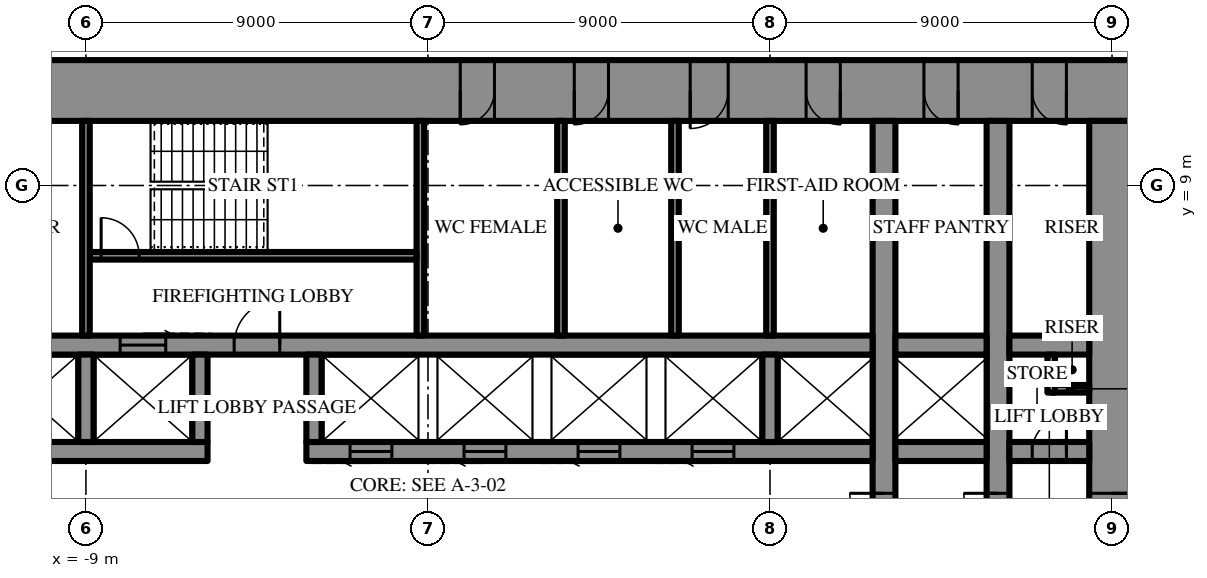
"""IFC4 building model, lengths in metres.
Left out: names, types, materials, properties, quantities, classifications, styles, units other than length and angle.
Written with IfcOpenShell. Run it as: python <this file> out.ifc"""

import sys

from ifc_helpers import new_model, si_unit, direction, frame, frame_2d, origin, place, context, subcontext, project, spatial, rectangle, extrude, element, fill, save


model = new_model("IFC4")
c1 = context("Model", 3, precision=1e-05, world=origin(), true_north=direction((0.0, 1.0)))
c2 = subcontext(c1, "Body", "Model", "MODEL_VIEW")
j1 = project(units=[si_unit("LENGTHUNIT", "METRE"), si_unit("PLANEANGLEUNIT", "RADIAN")], contexts=[c1])
p1 = place(None, origin())
s1 = spatial("IfcSite", under=j1, at=p1, CompositionType="ELEMENT")
p2 = place(p1, origin())
s2 = spatial("IfcBuilding", under=s1, at=p2, CompositionType="ELEMENT")
p3 = place(p2, frame((0.0, 0.0, 182.5)))
s3 = spatial("IfcBuildingStorey", under=s2, at=p3, CompositionType="ELEMENT", Elevation=182.5)
p4 = place(p3, frame((-18.6, 11.5, 0.0), z_axis=(0.0, 0.0, 1.0), x_axis=(1.0, 0.0, 0.0)))
e1 = element("IfcWall", 1, at=p4, inside=s3, PredefinedType="SHEAR", context=c2, shape_type="SweptSolid", body=[
    extrude(rectangle(XDim=37.2, YDim=1.6, at=frame_2d((18.6, 0.0))), origin(), (0.0, 0.0, 1.0), 4.2),
])
p5 = place(p4, frame((19.45, 0.0, 0.0)))
e2 = element("IfcOpeningElement", 2, at=p5, cuts=e1, PredefinedType="OPENING", context=c2, shape_type="SweptSolid", body=[
    extrude(rectangle(XDim=0.9, YDim=2.2, at=frame_2d((0.45, 1.1))), frame((0.0, 0.81, 0.0), z_axis=(0.0, -1.0, 0.0), x_axis=(1.0, 0.0, 0.0)), (0.0, 0.0, 1.0), 1.62),
])
p6 = place(p4, frame((22.45, 0.0, 0.0)))
e3 = element("IfcOpeningElement", 3, at=p6, cuts=e1, PredefinedType="OPENING", context=c2, shape_type="SweptSolid", body=[
    extrude(rectangle(XDim=0.9, YDim=2.2, at=frame_2d((0.45, 1.1))), frame((0.0, 0.81, 0.0), z_axis=(0.0, -1.0, 0.0), x_axis=(1.0, 0.0, 0.0)), (0.0, 0.0, 1.0), 1.62),
])
p7 = place(p4, frame((25.5, 0.0, 0.0)))
e4 = element("IfcOpeningElement", 4, at=p7, cuts=e1, PredefinedType="OPENING", context=c2, shape_type="SweptSolid", body=[
    extrude(rectangle(XDim=1.0, YDim=2.2, at=frame_2d((0.5, 1.1))), frame((0.0, 0.81, 0.0), z_axis=(0.0, -1.0, 0.0), x_axis=(1.0, 0.0, 0.0)), (0.0, 0.0, 1.0), 1.62),
])
p8 = place(p4, frame((1.8, 0.0, 0.0)))
e5 = element("IfcOpeningElement", 5, at=p8, cuts=e1, PredefinedType="OPENING", context=c2, shape_type="SweptSolid", body=[
    extrude(rectangle(XDim=0.9, YDim=2.2, at=frame_2d((0.45, 1.1))), frame((0.0, 0.81, 0.0), z_axis=(0.0, -1.0, 0.0), x_axis=(1.0, 0.0, 0.0)), (0.0, 0.0, 1.0), 1.62),
])
p9 = place(p4, frame((4.65, 0.0, 0.0)))
e6 = element("IfcOpeningElement", 6, at=p9, cuts=e1, PredefinedType="OPENING", context=c2, shape_type="SweptSolid", body=[
    extrude(rectangle(XDim=0.9, YDim=2.2, at=frame_2d((0.45, 1.1))), frame((0.0, 0.81, 0.0), z_axis=(0.0, -1.0, 0.0), x_axis=(1.0, 0.0, 0.0)), (0.0, 0.0, 1.0), 1.62),
])
p10 = place(p4, frame((7.75, 0.0, 0.0)))
e7 = element("IfcOpeningElement", 7, at=p10, cuts=e1, PredefinedType="OPENING", context=c2, shape_type="SweptSolid", body=[
    extrude(rectangle(XDim=0.9, YDim=2.2, at=frame_2d((0.45, 1.1))), frame((0.0, 0.81, 0.0), z_axis=(0.0, -1.0, 0.0), x_axis=(1.0, 0.0, 0.0)), (0.0, 0.0, 1.0), 1.62),
])
p11 = place(p4, frame((28.55, 0.0, 0.0)))
e8 = element("IfcOpeningElement", 8, at=p11, cuts=e1, PredefinedType="OPENING", context=c2, shape_type="SweptSolid", body=[
    extrude(rectangle(XDim=0.9, YDim=2.2, at=frame_2d((0.45, 1.1))), frame((0.0, 0.81, 0.0), z_axis=(0.0, -1.0, 0.0), x_axis=(1.0, 0.0, 0.0)), (0.0, 0.0, 1.0), 1.62),
])
p12 = place(p4, frame((31.65, 0.0, 0.0)))
e9 = element("IfcOpeningElement", 9, at=p12, cuts=e1, PredefinedType="OPENING", context=c2, shape_type="SweptSolid", body=[
    extrude(rectangle(XDim=0.9, YDim=2.2, at=frame_2d((0.45, 1.1))), frame((0.0, 0.81, 0.0), z_axis=(0.0, -1.0, 0.0), x_axis=(1.0, 0.0, 0.0)), (0.0, 0.0, 1.0), 1.62),
])
p13 = place(p4, frame((34.5, 0.0, 0.0)))
e10 = element("IfcOpeningElement", 10, at=p13, cuts=e1, PredefinedType="OPENING", context=c2, shape_type="SweptSolid", body=[
    extrude(rectangle(XDim=0.9, YDim=2.2, at=frame_2d((0.45, 1.1))), frame((0.0, 0.81, 0.0), z_axis=(0.0, -1.0, 0.0), x_axis=(1.0, 0.0, 0.0)), (0.0, 0.0, 1.0), 1.62),
])
p14 = place(p3, frame((18.0, -10.7, 0.0), z_axis=(0.0, 0.0, 1.0), x_axis=(0.0, 1.0, 0.0)))
e11 = element("IfcWall", 11, at=p14, inside=s3, PredefinedType="SHEAR", context=c2, shape_type="SweptSolid", body=[
    extrude(rectangle(XDim=21.4, YDim=1.2, at=frame_2d((10.7, 0.0))), origin(), (0.0, 0.0, 1.0), 4.2),
])
p15 = place(p14, frame((9.8, 0.0, 0.0)))
e12 = element("IfcOpeningElement", 12, at=p15, cuts=e11, PredefinedType="OPENING", context=c2, shape_type="SweptSolid", body=[
    extrude(rectangle(XDim=1.8, YDim=2.4, at=frame_2d((0.9, 1.2))), frame((0.0, 0.61, 0.0), z_axis=(0.0, -1.0, 0.0), x_axis=(1.0, 0.0, 0.0)), (0.0, 0.0, 1.0), 1.22),
])
p16 = place(p3, frame((12.0, -10.7, 0.0), z_axis=(0.0, 0.0, 1.0), x_axis=(0.0, 1.0, 0.0)))
e13 = element("IfcWall", 13, at=p16, inside=s3, PredefinedType="SHEAR", context=c2, shape_type="SweptSolid", body=[
    extrude(rectangle(XDim=21.4, YDim=0.6, at=frame_2d((10.7, 0.0))), origin(), (0.0, 0.0, 1.0), 4.2),
])
p17 = place(p16, frame((9.8, 0.0, 0.0)))
e14 = element("IfcOpeningElement", 14, at=p17, cuts=e13, PredefinedType="OPENING", context=c2, shape_type="SweptSolid", body=[
    extrude(rectangle(XDim=1.8, YDim=2.4, at=frame_2d((0.9, 1.2))), frame((0.0, 0.31, 0.0), z_axis=(0.0, -1.0, 0.0), x_axis=(1.0, 0.0, 0.0)), (0.0, 0.0, 1.0), 0.62),
])
p18 = place(p3, frame((15.0, -10.7, 0.0), z_axis=(0.0, 0.0, 1.0), x_axis=(0.0, 1.0, 0.0)))
e15 = element("IfcWall", 15, at=p18, inside=s3, PredefinedType="SHEAR", context=c2, shape_type="SweptSolid", body=[
    extrude(rectangle(XDim=21.4, YDim=0.6, at=frame_2d((10.7, 0.0))), origin(), (0.0, 0.0, 1.0), 4.2),
])
p19 = place(p18, frame((9.8, 0.0, 0.0)))
e16 = element("IfcOpeningElement", 16, at=p19, cuts=e15, PredefinedType="OPENING", context=c2, shape_type="SweptSolid", body=[
    extrude(rectangle(XDim=1.8, YDim=2.4, at=frame_2d((0.9, 1.2))), frame((0.0, 0.31, 0.0), z_axis=(0.0, -1.0, 0.0), x_axis=(1.0, 0.0, 0.0)), (0.0, 0.0, 1.0), 0.62),
])
p20 = place(p3, frame((-11.7, 2.0, 0.0), z_axis=(0.0, 0.0, 1.0), x_axis=(1.0, 0.0, 0.0)))
e17 = element("IfcWall", 17, at=p20, inside=s3, PredefinedType="SHEAR", context=c2, shape_type="SweptSolid", body=[
    extrude(rectangle(XDim=5.9, YDim=0.5, at=frame_2d((2.95, 0.0))), origin(), (0.0, 0.0, 1.0), 4.2),
])
p21 = place(p3, frame((-3.2, 2.0, 0.0), z_axis=(0.0, 0.0, 1.0), x_axis=(1.0, 0.0, 0.0)))
e18 = element("IfcWall", 18, at=p21, inside=s3, PredefinedType="SHEAR", context=c2, shape_type="SweptSolid", body=[
    extrude(rectangle(XDim=14.9, YDim=0.5, at=frame_2d((7.45, 0.0))), origin(), (0.0, 0.0, 1.0), 4.2),
])
p22 = place(p21, frame((1.15, 0.0, 0.0)))
e19 = element("IfcOpeningElement", 19, at=p22, cuts=e18, PredefinedType="OPENING", context=c2, shape_type="SweptSolid", body=[
    extrude(rectangle(XDim=1.1, YDim=2.2, at=frame_2d((0.55, 1.1))), frame((0.0, 0.26, 0.0), z_axis=(0.0, -1.0, 0.0), x_axis=(1.0, 0.0, 0.0)), (0.0, 0.0, 1.0), 0.52),
])
p23 = place(p21, frame((4.15, 0.0, 0.0)))
e20 = element("IfcOpeningElement", 20, at=p23, cuts=e18, PredefinedType="OPENING", context=c2, shape_type="SweptSolid", body=[
    extrude(rectangle(XDim=1.1, YDim=2.2, at=frame_2d((0.55, 1.1))), frame((0.0, 0.26, 0.0), z_axis=(0.0, -1.0, 0.0), x_axis=(1.0, 0.0, 0.0)), (0.0, 0.0, 1.0), 0.52),
])
p24 = place(p21, frame((7.15, 0.0, 0.0)))
e21 = element("IfcOpeningElement", 21, at=p24, cuts=e18, PredefinedType="OPENING", context=c2, shape_type="SweptSolid", body=[
    extrude(rectangle(XDim=1.1, YDim=2.2, at=frame_2d((0.55, 1.1))), frame((0.0, 0.26, 0.0), z_axis=(0.0, -1.0, 0.0), x_axis=(1.0, 0.0, 0.0)), (0.0, 0.0, 1.0), 0.52),
])
p25 = place(p21, frame((10.15, 0.0, 0.0)))
e22 = element("IfcOpeningElement", 22, at=p25, cuts=e18, PredefinedType="OPENING", context=c2, shape_type="SweptSolid", body=[
    extrude(rectangle(XDim=1.1, YDim=2.2, at=frame_2d((0.55, 1.1))), frame((0.0, 0.26, 0.0), z_axis=(0.0, -1.0, 0.0), x_axis=(1.0, 0.0, 0.0)), (0.0, 0.0, 1.0), 0.52),
])
p26 = place(p3, frame((12.3, 2.0, 0.0), z_axis=(0.0, 0.0, 1.0), x_axis=(1.0, 0.0, 0.0)))
e23 = element("IfcWall", 23, at=p26, inside=s3, PredefinedType="SHEAR", context=c2, shape_type="SweptSolid", body=[
    extrude(rectangle(XDim=2.4, YDim=0.5, at=frame_2d((1.2, 0.0))), origin(), (0.0, 0.0, 1.0), 4.2),
])
p27 = place(p3, frame((15.3, 2.0, 0.0), z_axis=(0.0, 0.0, 1.0), x_axis=(1.0, 0.0, 0.0)))
e24 = element("IfcWall", 24, at=p27, inside=s3, PredefinedType="SHEAR", context=c2, shape_type="SweptSolid", body=[
    extrude(rectangle(XDim=2.1, YDim=0.5, at=frame_2d((1.05, 0.0))), origin(), (0.0, 0.0, 1.0), 4.2),
])
p28 = place(p27, frame((0.6, 0.0, 0.0)))
e25 = element("IfcOpeningElement", 25, at=p28, cuts=e24, PredefinedType="OPENING", context=c2, shape_type="SweptSolid", body=[
    extrude(rectangle(XDim=0.9, YDim=2.2, at=frame_2d((0.45, 1.1))), frame((0.0, 0.26, 0.0), z_axis=(0.0, -1.0, 0.0), x_axis=(1.0, 0.0, 0.0)), (0.0, 0.0, 1.0), 0.52),
])
p29 = place(p3, frame((-11.7, 4.8, 0.0), z_axis=(0.0, 0.0, 1.0), x_axis=(1.0, 0.0, 0.0)))
e26 = element("IfcWall", 26, at=p29, inside=s3, PredefinedType="SHEAR", context=c2, shape_type="SweptSolid", body=[
    extrude(rectangle(XDim=23.4, YDim=0.5, at=frame_2d((11.7, 0.0))), origin(), (0.0, 0.0, 1.0), 4.2),
])
p30 = place(p29, frame((6.6, 0.0, 0.0)))
e27 = element("IfcOpeningElement", 27, at=p30, cuts=e26, PredefinedType="OPENING", context=c2, shape_type="SweptSolid", body=[
    extrude(rectangle(XDim=1.2, YDim=2.2, at=frame_2d((0.6, 1.1))), frame((0.0, 0.26, 0.0), z_axis=(0.0, -1.0, 0.0), x_axis=(1.0, 0.0, 0.0)), (0.0, 0.0, 1.0), 0.52),
])
p31 = place(p29, frame((3.6, 0.0, 0.0)))
e28 = element("IfcOpeningElement", 28, at=p31, cuts=e26, PredefinedType="OPENING", context=c2, shape_type="SweptSolid", body=[
    extrude(rectangle(XDim=1.2, YDim=2.2, at=frame_2d((0.6, 1.1))), frame((0.0, 0.26, 0.0), z_axis=(0.0, -1.0, 0.0), x_axis=(1.0, 0.0, 0.0)), (0.0, 0.0, 1.0), 0.52),
])
p32 = place(p3, frame((12.3, 4.8, 0.0), z_axis=(0.0, 0.0, 1.0), x_axis=(1.0, 0.0, 0.0)))
e29 = element("IfcWall", 29, at=p32, inside=s3, PredefinedType="SHEAR", context=c2, shape_type="SweptSolid", body=[
    extrude(rectangle(XDim=2.4, YDim=0.5, at=frame_2d((1.2, 0.0))), origin(), (0.0, 0.0, 1.0), 4.2),
])
p33 = place(p3, frame((15.3, 4.8, 0.0), z_axis=(0.0, 0.0, 1.0), x_axis=(1.0, 0.0, 0.0)))
e30 = element("IfcWall", 30, at=p33, inside=s3, PredefinedType="SHEAR", context=c2, shape_type="SweptSolid", body=[
    extrude(rectangle(XDim=2.1, YDim=0.5, at=frame_2d((1.05, 0.0))), origin(), (0.0, 0.0, 1.0), 4.2),
])
for number, where, z_axis, x_axis in (
    (31, (-9.0, 2.25, 0.0), (0.0, 0.0, 1.0), (0.0, 1.0, 0.0)),
    (32, (-6.0, 2.25, 0.0), (0.0, 0.0, 1.0), (0.0, 1.0, 0.0)),
    (33, (-3.0, 2.25, 0.0), (0.0, 0.0, 1.0), (0.0, 1.0, 0.0)),
    (34, (9.0, 2.25, 0.0), (0.0, 0.0, 1.0), (0.0, 1.0, 0.0)),
):
    element("IfcWall", number, at=place(p3, frame(where, z_axis=z_axis, x_axis=x_axis)), inside=s3, PredefinedType="SHEAR", context=c2, shape_type="SweptSolid", body=[
        extrude(rectangle(XDim=2.3, YDim=0.4, at=frame_2d((1.15, 0.0))), origin(), (0.0, 0.0, 1.0), 4.2),
    ])
p34 = place(p3, frame((-0.2, 5.05, 0.0), z_axis=(0.0, 0.0, 1.0), x_axis=(0.0, 1.0, 0.0)))
e35 = element("IfcWall", 35, at=p34, inside=s3, PredefinedType="SHEAR", context=c2, shape_type="SweptSolid", body=[
    extrude(rectangle(XDim=5.65, YDim=0.2, at=frame_2d((2.825, 0.0))), origin(), (0.0, 0.0, 1.0), 4.2),
])
p35 = place(p3, frame((-8.9, 7.15, 0.0), z_axis=(0.0, 0.0, 1.0), x_axis=(1.0, 0.0, 0.0)))
e36 = element("IfcWall", 36, at=p35, inside=s3, PredefinedType="SHEAR", context=c2, shape_type="SweptSolid", body=[
    extrude(rectangle(XDim=8.6, YDim=0.2, at=frame_2d((4.3, 0.0))), origin(), (0.0, 0.0, 1.0), 4.2),
])
p36 = place(p35, frame((0.3, 0.0, 0.0)))
e37 = element("IfcOpeningElement", 37, at=p36, cuts=e36, PredefinedType="OPENING", context=c2, shape_type="SweptSolid", body=[
    extrude(rectangle(XDim=1.0, YDim=2.2, at=frame_2d((0.5, 1.1))), frame((0.0, 0.11, 0.0), z_axis=(0.0, -1.0, 0.0), x_axis=(1.0, 0.0, 0.0)), (0.0, 0.0, 1.0), 0.22),
])
for number, where, z_axis, x_axis in (
    (38, (-9.0, 5.05, 0.0), (0.0, 0.0, 1.0), (0.0, 1.0, 0.0)),
    (39, (9.0, 5.05, 0.0), (0.0, 0.0, 1.0), (0.0, 1.0, 0.0)),
    (40, (3.5, 5.05, 0.0), (0.0, 0.0, 1.0), (0.0, 1.0, 0.0)),
    (41, (6.5, 5.05, 0.0), (0.0, 0.0, 1.0), (0.0, 1.0, 0.0)),
):
    element("IfcWall", number, at=place(p3, frame(where, z_axis=z_axis, x_axis=x_axis)), inside=s3, PredefinedType="PARTITIONING", context=c2, shape_type="SweptSolid", body=[
        extrude(rectangle(XDim=5.65, YDim=0.2, at=frame_2d((2.825, 0.0))), origin(), (0.0, 0.0, 1.0), 4.0),
    ])
for number, where, z_axis, x_axis in (
    (42, (16.4, 3.65, 0.0), (0.0, 0.0, 1.0), (1.0, 0.0, 0.0)),
    (43, (16.4, 3.55, 0.0), (0.0, 0.0, 1.0), (0.0, 1.0, 0.0)),
):
    element("IfcWall", number, at=place(p3, frame(where, z_axis=z_axis, x_axis=x_axis)), inside=s3, PredefinedType="PARTITIONING", context=c2, shape_type="SweptSolid", body=[
        extrude(rectangle(XDim=1.0, YDim=0.2, at=frame_2d((0.5, 0.0))), origin(), (0.0, 0.0, 1.0), 4.0),
    ])
p37 = place(p15, frame((1.8, 0.0, 0.0), z_axis=(0.0, 0.0, 1.0), x_axis=(-1.0, 0.0, 0.0)))
e44 = element("IfcDoor", 44, at=p37, inside=s3, OperationType="DOUBLE_DOOR_SINGLE_SWING", PredefinedType="DOOR", context=c2, shape_type="SweptSolid", body=[
    extrude(rectangle(XDim=1.8, YDim=2.4, at=frame_2d((0.9, 1.2))), frame((0.0, 0.025, 0.0), z_axis=(0.0, -1.0, 0.0), x_axis=(1.0, 0.0, 0.0)), (0.0, 0.0, 1.0), 0.05),
])
fill(e12, e44)
p38 = place(p30, origin())
e45 = element("IfcDoor", 45, at=p38, inside=s3, OperationType="SINGLE_SWING_LEFT", PredefinedType="DOOR", context=c2, shape_type="SweptSolid", body=[
    extrude(rectangle(XDim=1.2, YDim=2.2, at=frame_2d((0.6, 1.1))), frame((0.0, 0.025, 0.0), z_axis=(0.0, -1.0, 0.0), x_axis=(1.0, 0.0, 0.0)), (0.0, 0.0, 1.0), 0.05),
])
fill(e27, e45)
p39 = place(p36, origin())
e46 = element("IfcDoor", 46, at=p39, inside=s3, OperationType="SINGLE_SWING_RIGHT", PredefinedType="DOOR", context=c2, shape_type="SweptSolid", body=[
    extrude(rectangle(XDim=1.0, YDim=2.2, at=frame_2d((0.5, 1.1))), frame((0.0, 0.025, 0.0), z_axis=(0.0, -1.0, 0.0), x_axis=(1.0, 0.0, 0.0)), (0.0, 0.0, 1.0), 0.05),
])
fill(e37, e46)
p40 = place(p5, frame((0.9, 0.0, 0.0), z_axis=(0.0, 0.0, 1.0), x_axis=(-1.0, 0.0, 0.0)))
e47 = element("IfcDoor", 47, at=p40, inside=s3, OperationType="SINGLE_SWING_LEFT", PredefinedType="DOOR", context=c2, shape_type="SweptSolid", body=[
    extrude(rectangle(XDim=0.9, YDim=2.2, at=frame_2d((0.45, 1.1))), frame((0.0, 0.025, 0.0), z_axis=(0.0, -1.0, 0.0), x_axis=(1.0, 0.0, 0.0)), (0.0, 0.0, 1.0), 0.05),
])
fill(e2, e47)
p41 = place(p6, frame((0.9, 0.0, 0.0), z_axis=(0.0, 0.0, 1.0), x_axis=(-1.0, 0.0, 0.0)))
e48 = element("IfcDoor", 48, at=p41, inside=s3, OperationType="SINGLE_SWING_LEFT", PredefinedType="DOOR", context=c2, shape_type="SweptSolid", body=[
    extrude(rectangle(XDim=0.9, YDim=2.2, at=frame_2d((0.45, 1.1))), frame((0.0, 0.025, 0.0), z_axis=(0.0, -1.0, 0.0), x_axis=(1.0, 0.0, 0.0)), (0.0, 0.0, 1.0), 0.05),
])
fill(e3, e48)
p42 = place(p7, frame((1.0, 0.0, 0.0), z_axis=(0.0, 0.0, 1.0), x_axis=(-1.0, 0.0, 0.0)))
e49 = element("IfcDoor", 49, at=p42, inside=s3, OperationType="SINGLE_SWING_LEFT", PredefinedType="DOOR", context=c2, shape_type="SweptSolid", body=[
    extrude(rectangle(XDim=1.0, YDim=2.2, at=frame_2d((0.5, 1.1))), frame((0.0, 0.025, 0.0), z_axis=(0.0, -1.0, 0.0), x_axis=(1.0, 0.0, 0.0)), (0.0, 0.0, 1.0), 0.05),
])
fill(e4, e49)
p43 = place(p11, frame((0.9, 0.0, 0.0), z_axis=(0.0, 0.0, 1.0), x_axis=(-1.0, 0.0, 0.0)))
e50 = element("IfcDoor", 50, at=p43, inside=s3, OperationType="SINGLE_SWING_RIGHT", PredefinedType="DOOR", context=c2, shape_type="SweptSolid", body=[
    extrude(rectangle(XDim=0.9, YDim=2.2, at=frame_2d((0.45, 1.1))), frame((0.0, 0.025, 0.0), z_axis=(0.0, -1.0, 0.0), x_axis=(1.0, 0.0, 0.0)), (0.0, 0.0, 1.0), 0.05),
])
fill(e8, e50)
p44 = place(p12, frame((0.9, 0.0, 0.0), z_axis=(0.0, 0.0, 1.0), x_axis=(-1.0, 0.0, 0.0)))
e51 = element("IfcDoor", 51, at=p44, inside=s3, OperationType="SINGLE_SWING_RIGHT", PredefinedType="DOOR", context=c2, shape_type="SweptSolid", body=[
    extrude(rectangle(XDim=0.9, YDim=2.2, at=frame_2d((0.45, 1.1))), frame((0.0, 0.025, 0.0), z_axis=(0.0, -1.0, 0.0), x_axis=(1.0, 0.0, 0.0)), (0.0, 0.0, 1.0), 0.05),
])
fill(e9, e51)
p45 = place(p13, frame((0.9, 0.0, 0.0), z_axis=(0.0, 0.0, 1.0), x_axis=(-1.0, 0.0, 0.0)))
e52 = element("IfcDoor", 52, at=p45, inside=s3, OperationType="SINGLE_SWING_RIGHT", PredefinedType="DOOR", context=c2, shape_type="SweptSolid", body=[
    extrude(rectangle(XDim=0.9, YDim=2.2, at=frame_2d((0.45, 1.1))), frame((0.0, 0.025, 0.0), z_axis=(0.0, -1.0, 0.0), x_axis=(1.0, 0.0, 0.0)), (0.0, 0.0, 1.0), 0.05),
])
fill(e10, e52)
p46 = place(p28, origin())
e53 = element("IfcDoor", 53, at=p46, inside=s3, OperationType="SINGLE_SWING_LEFT", PredefinedType="DOOR", context=c2, shape_type="SweptSolid", body=[
    extrude(rectangle(XDim=0.9, YDim=2.2, at=frame_2d((0.45, 1.1))), frame((0.0, 0.025, 0.0), z_axis=(0.0, -1.0, 0.0), x_axis=(1.0, 0.0, 0.0)), (0.0, 0.0, 1.0), 0.05),
])
fill(e25, e53)
p47 = place(p17, origin())
e54 = element("IfcDoor", 54, at=p47, inside=s3, OperationType="DOUBLE_DOOR_SINGLE_SWING", PredefinedType="DOOR", context=c2, shape_type="SweptSolid", body=[
    extrude(rectangle(XDim=1.8, YDim=2.4, at=frame_2d((0.9, 1.2))), frame((0.0, 0.025, 0.0), z_axis=(0.0, -1.0, 0.0), x_axis=(1.0, 0.0, 0.0)), (0.0, 0.0, 1.0), 0.05),
])
fill(e14, e54)
p48 = place(p19, origin())
e55 = element("IfcDoor", 55, at=p48, inside=s3, OperationType="DOUBLE_DOOR_SINGLE_SWING", PredefinedType="DOOR", context=c2, shape_type="SweptSolid", body=[
    extrude(rectangle(XDim=1.8, YDim=2.4, at=frame_2d((0.9, 1.2))), frame((0.0, 0.025, 0.0), z_axis=(0.0, -1.0, 0.0), x_axis=(1.0, 0.0, 0.0)), (0.0, 0.0, 1.0), 0.05),
])
fill(e16, e55)
p49 = place(p31, origin())
e56 = element("IfcDoor", 56, at=p49, inside=s3, OperationType="SLIDING_TO_LEFT", PredefinedType="DOOR", context=c2, shape_type="SweptSolid", body=[
    extrude(rectangle(XDim=1.2, YDim=2.2, at=frame_2d((0.6, 1.1))), frame((0.0, 0.025, 0.0), z_axis=(0.0, -1.0, 0.0), x_axis=(1.0, 0.0, 0.0)), (0.0, 0.0, 1.0), 0.05),
])
fill(e28, e56)
p50 = place(p22, frame((1.1, 0.0, 0.0), z_axis=(0.0, 0.0, 1.0), x_axis=(-1.0, 0.0, 0.0)))
e57 = element("IfcDoor", 57, at=p50, inside=s3, OperationType="SLIDING_TO_LEFT", PredefinedType="DOOR", context=c2, shape_type="SweptSolid", body=[
    extrude(rectangle(XDim=1.1, YDim=2.2, at=frame_2d((0.55, 1.1))), frame((0.0, 0.025, 0.0), z_axis=(0.0, -1.0, 0.0), x_axis=(1.0, 0.0, 0.0)), (0.0, 0.0, 1.0), 0.05),
])
fill(e19, e57)
p51 = place(p23, frame((1.1, 0.0, 0.0), z_axis=(0.0, 0.0, 1.0), x_axis=(-1.0, 0.0, 0.0)))
e58 = element("IfcDoor", 58, at=p51, inside=s3, OperationType="SLIDING_TO_LEFT", PredefinedType="DOOR", context=c2, shape_type="SweptSolid", body=[
    extrude(rectangle(XDim=1.1, YDim=2.2, at=frame_2d((0.55, 1.1))), frame((0.0, 0.025, 0.0), z_axis=(0.0, -1.0, 0.0), x_axis=(1.0, 0.0, 0.0)), (0.0, 0.0, 1.0), 0.05),
])
fill(e20, e58)
p52 = place(p24, frame((1.1, 0.0, 0.0), z_axis=(0.0, 0.0, 1.0), x_axis=(-1.0, 0.0, 0.0)))
e59 = element("IfcDoor", 59, at=p52, inside=s3, OperationType="SLIDING_TO_LEFT", PredefinedType="DOOR", context=c2, shape_type="SweptSolid", body=[
    extrude(rectangle(XDim=1.1, YDim=2.2, at=frame_2d((0.55, 1.1))), frame((0.0, 0.025, 0.0), z_axis=(0.0, -1.0, 0.0), x_axis=(1.0, 0.0, 0.0)), (0.0, 0.0, 1.0), 0.05),
])
fill(e21, e59)
p53 = place(p25, frame((1.1, 0.0, 0.0), z_axis=(0.0, 0.0, 1.0), x_axis=(-1.0, 0.0, 0.0)))
e60 = element("IfcDoor", 60, at=p53, inside=s3, OperationType="SLIDING_TO_LEFT", PredefinedType="DOOR", context=c2, shape_type="SweptSolid", body=[
    extrude(rectangle(XDim=1.1, YDim=2.2, at=frame_2d((0.55, 1.1))), frame((0.0, 0.025, 0.0), z_axis=(0.0, -1.0, 0.0), x_axis=(1.0, 0.0, 0.0)), (0.0, 0.0, 1.0), 0.05),
])
fill(e22, e60)
save(model, sys.argv[1])
